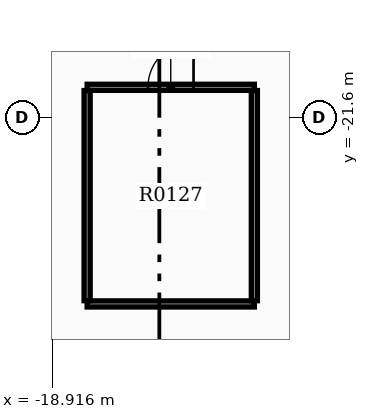
"""IFC4 building model, lengths in metres.
Left out: names, types, materials, properties, quantities, classifications, styles, units other than length and angle.
Written with IfcOpenShell. Run it as: python <this file> out.ifc"""

import sys

from ifc_helpers import new_model, si_unit, direction, frame, frame_2d, origin, place, context, subcontext, project, spatial, rectangle, extrude, element, fill, save


model = new_model("IFC4")
c1 = context("Model", 3, precision=1e-05, world=origin(), true_north=direction((0.0, 1.0)))
c2 = subcontext(c1, "Body", "Model", "MODEL_VIEW")
j1 = project(units=[si_unit("LENGTHUNIT", "METRE"), si_unit("PLANEANGLEUNIT", "RADIAN")], contexts=[c1])
p1 = place(None, origin())
s1 = spatial("IfcSite", under=j1, at=p1, CompositionType="ELEMENT")
p2 = place(p1, origin())
s2 = spatial("IfcBuilding", under=s1, at=p2, CompositionType="ELEMENT")
p3 = place(p2, origin())
s3 = spatial("IfcBuildingStorey", under=s2, at=p3, CompositionType="ELEMENT", Elevation=0.0)
p4 = place(p3, frame((-18.0, -26.5, 0.0), z_axis=(0.0, 0.0, 1.0), x_axis=(1.0, 0.0, 0.0)))
e1 = element("IfcWall", 1, at=p4, inside=s3, PredefinedType="PARTITIONING", context=c2, shape_type="SweptSolid", body=[
    extrude(rectangle(XDim=4.4, YDim=0.16, at=frame_2d((2.2, 0.0))), origin(), (0.0, 0.0, 1.0), 2.67),
])
p5 = place(p3, frame((-18.0, -20.8, 0.0), z_axis=(0.0, 0.0, 1.0), x_axis=(1.0, 0.0, 0.0)))
e2 = element("IfcWall", 2, at=p5, inside=s3, PredefinedType="PARTITIONING", context=c2, shape_type="SweptSolid", body=[
    extrude(rectangle(XDim=4.4, YDim=0.16, at=frame_2d((2.2, 0.0))), origin(), (0.0, 0.0, 1.0), 2.67),
])
p6 = place(p5, frame((1.6, 0.0, 0.0)))
e3 = element("IfcOpeningElement", 3, at=p6, cuts=e2, PredefinedType="OPENING", context=c2, shape_type="SweptSolid", body=[
    extrude(rectangle(XDim=1.2, YDim=2.15, at=frame_2d((0.6, 1.075))), frame((0.0, 0.09, 0.0), z_axis=(0.0, -1.0, 0.0), x_axis=(1.0, 0.0, 0.0)), (0.0, 0.0, 1.0), 0.18),
])
for number, where, z_axis, x_axis in (
    (4, (-18.0, -26.415, 0.0), (0.0, 0.0, 1.0), (0.0, 1.0, 0.0)),
    (5, (-13.6, -26.415, 0.0), (0.0, 0.0, 1.0), (0.0, 1.0, 0.0)),
):
    element("IfcWall", number, at=place(p3, frame(where, z_axis=z_axis, x_axis=x_axis)), inside=s3, PredefinedType="PARTITIONING", context=c2, shape_type="SweptSolid", body=[
        extrude(rectangle(XDim=5.53, YDim=0.16, at=frame_2d((2.765, 0.0))), origin(), (0.0, 0.0, 1.0), 2.67),
    ])
p7 = place(p6, origin())
e6 = element("IfcDoor", 6, at=p7, inside=s3, OperationType="SINGLE_SWING_RIGHT", PredefinedType="DOOR", context=c2, shape_type="SweptSolid", body=[
    extrude(rectangle(XDim=1.2, YDim=2.15, at=frame_2d((0.6, 1.075))), frame((0.0, 0.025, 0.0), z_axis=(0.0, -1.0, 0.0), x_axis=(1.0, 0.0, 0.0)), (0.0, 0.0, 1.0), 0.05),
])
fill(e3, e6)
save(model, sys.argv[1])
